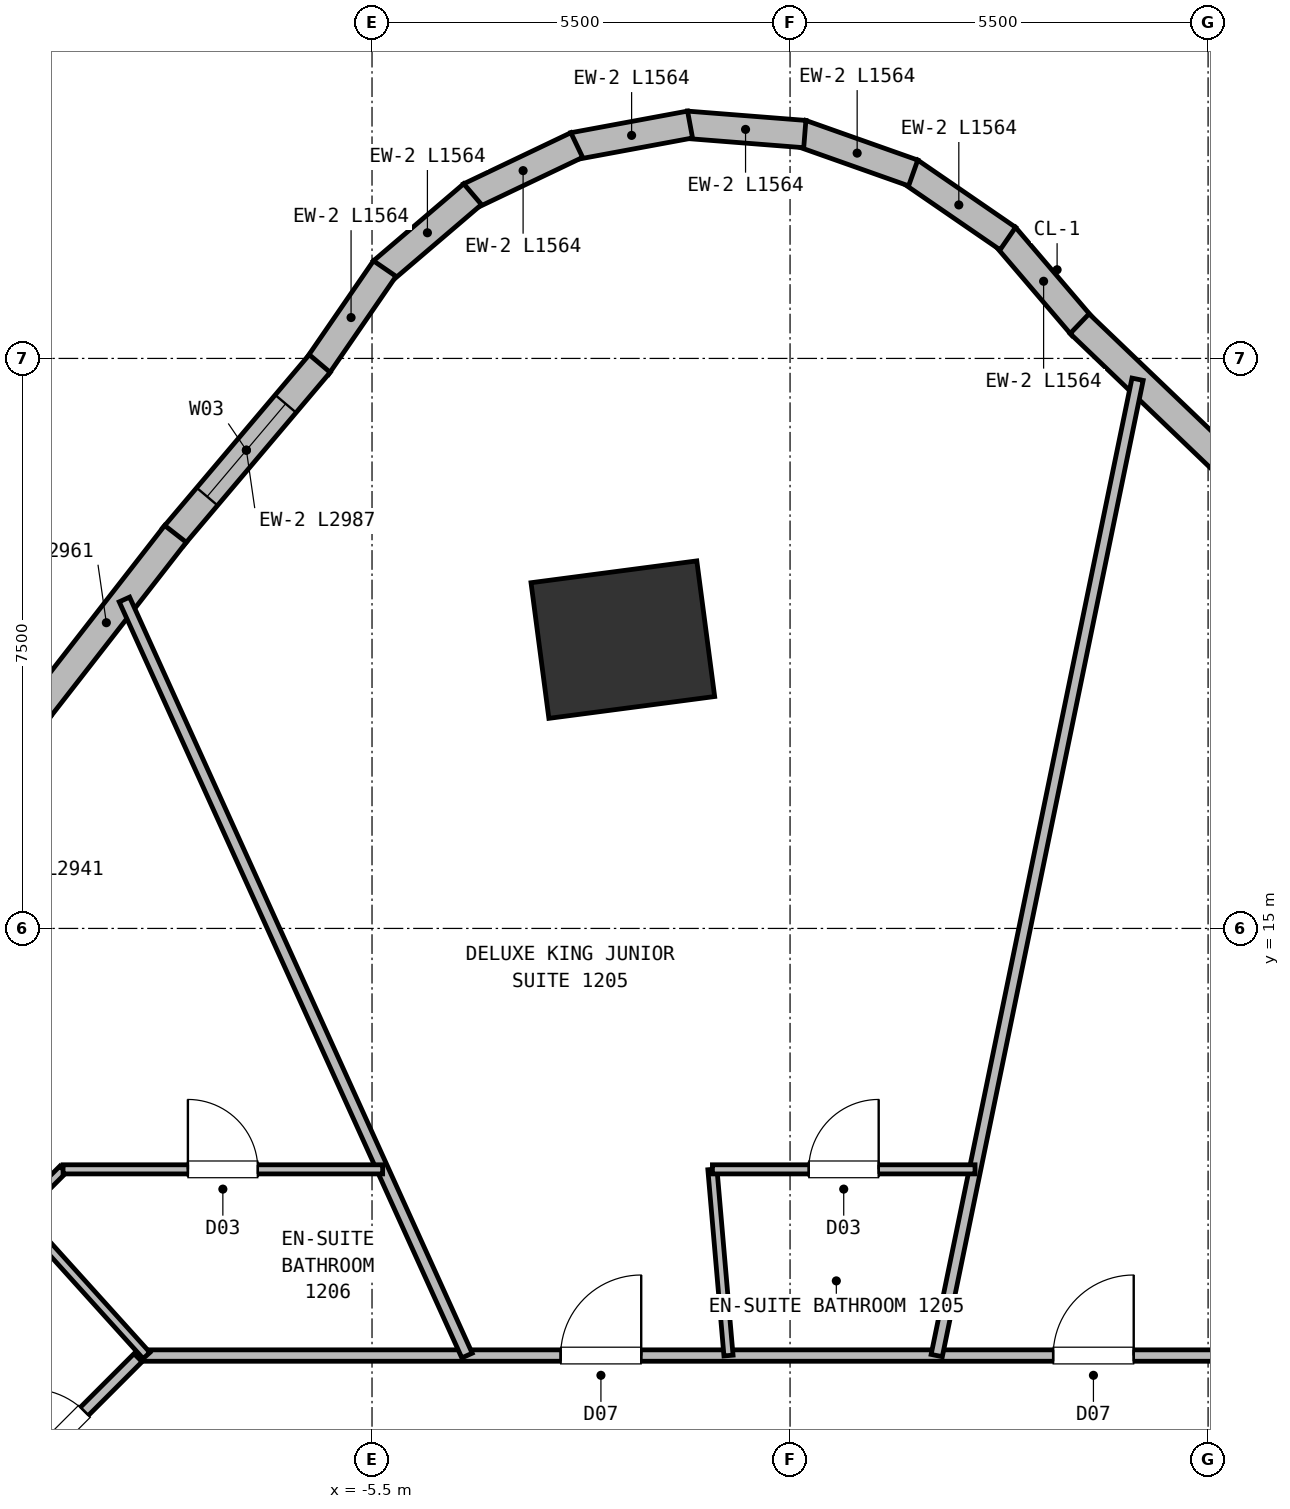
"""IFC4 building model, lengths in metres.
Left out: names, types, materials, properties, quantities, classifications, styles, units other than length and angle.
Written with IfcOpenShell. Run it as: python <this file> out.ifc"""

import sys

from ifc_helpers import new_model, si_unit, direction, frame, frame_2d, origin, origin_2d, place, context, subcontext, project, spatial, rectangle, extrude, element, fill, save


model = new_model("IFC4")
c1 = context("Model", 3, precision=1e-05, world=origin(), true_north=direction((0.0, 1.0)))
c2 = subcontext(c1, "Body", "Model", "MODEL_VIEW")
j1 = project(units=[si_unit("LENGTHUNIT", "METRE"), si_unit("PLANEANGLEUNIT", "RADIAN")], contexts=[c1])
p1 = place(None, origin())
s1 = spatial("IfcSite", under=j1, at=p1, CompositionType="ELEMENT")
p2 = place(p1, origin())
s2 = spatial("IfcBuilding", under=s1, at=p2, CompositionType="ELEMENT")
p3 = place(p2, frame((0.0, 0.0, 41.75)))
s3 = spatial("IfcBuildingStorey", under=s2, at=p3, CompositionType="ELEMENT", Elevation=41.75)
p4 = place(p3, frame((-2.2, 18.8, 0.0), z_axis=(0.0, 0.0, 1.0), x_axis=(-0.13052619222, 0.991444861374, 0.0)))
e1 = element("IfcColumn", 1, at=p4, inside=s3, PredefinedType="COLUMN", context=c2, shape_type="SweptSolid", body=[
    extrude(rectangle(XDim=1.8, YDim=2.2, at=origin_2d()), origin(), (0.0, 0.0, 1.0), 3.75),
])
p5 = place(p3, frame((2.828, 24.11, 0.0), z_axis=(0.0, 0.0, 1.0), x_axis=(0.649427555808, -0.76042346739, 0.0)))
e2 = element("IfcWall", 2, at=p5, inside=s3, PredefinedType="SOLIDWALL", context=c2, shape_type="SweptSolid", body=[
    extrude(rectangle(XDim=1.564, YDim=0.36, at=frame_2d((0.782, 0.0))), origin(), (0.0, 0.0, 1.0), 3.5),
])
p6 = place(p3, frame((1.576, 24.963, 0.0), z_axis=(0.0, 0.0, 1.0), x_axis=(0.824114783412, -0.56642283125, 0.0)))
e3 = element("IfcWall", 3, at=p6, inside=s3, PredefinedType="SOLIDWALL", context=c2, shape_type="SweptSolid", body=[
    extrude(rectangle(XDim=1.564, YDim=0.36, at=frame_2d((0.782, 0.0))), origin(), (0.0, 0.0, 1.0), 3.5),
])
p7 = place(p3, frame((0.146, 25.462, 0.0), z_axis=(0.0, 0.0, 1.0), x_axis=(0.94263541034, -0.333824030251, 0.0)))
e4 = element("IfcWall", 4, at=p7, inside=s3, PredefinedType="SOLIDWALL", context=c2, shape_type="SweptSolid", body=[
    extrude(rectangle(XDim=1.564, YDim=0.36, at=frame_2d((0.782, 0.0))), origin(), (0.0, 0.0, 1.0), 3.5),
])
for number, where, z_axis, x_axis in (
    (5, (-1.365, 25.575, 0.0), (0.0, 0.0, 1.0), (0.997, -0.079, 0.0)),
    (6, (-2.854, 25.292, 0.0), (0.0, 0.0, 1.0), (0.983, 0.182, 0.0)),
):
    element("IfcWall", number, at=place(p3, frame(where, z_axis=z_axis, x_axis=x_axis)), inside=s3, PredefinedType="SOLIDWALL", context=c2, shape_type="SweptSolid", body=[
        extrude(rectangle(XDim=1.564, YDim=0.36, at=frame_2d((0.782, 0.0))), origin(), (0.0, 0.0, 1.0), 3.5),
    ])
p8 = place(p3, frame((-4.218, 24.634, 0.0), z_axis=(0.0, 0.0, 1.0), x_axis=(0.902606480138, 0.430466656099, 0.0)))
e7 = element("IfcWall", 7, at=p8, inside=s3, PredefinedType="SOLIDWALL", context=c2, shape_type="SweptSolid", body=[
    extrude(rectangle(XDim=1.564, YDim=0.36, at=frame_2d((0.782, 0.0))), origin(), (0.0, 0.0, 1.0), 3.5),
])
p9 = place(p3, frame((-5.366, 23.646, 0.0), z_axis=(0.0, 0.0, 1.0), x_axis=(0.760489297029, 0.649350467086, 0.0)))
e8 = element("IfcWall", 8, at=p9, inside=s3, PredefinedType="SOLIDWALL", context=c2, shape_type="SweptSolid", body=[
    extrude(rectangle(XDim=1.564, YDim=0.36, at=frame_2d((0.782, 0.0))), origin(), (0.0, 0.0, 1.0), 3.5),
])
p10 = place(p3, frame((-6.219, 22.393, 0.0), z_axis=(0.0, 0.0, 1.0), x_axis=(0.56642283125, 0.824114783412, 0.0)))
e9 = element("IfcWall", 9, at=p10, inside=s3, PredefinedType="SOLIDWALL", context=c2, shape_type="SweptSolid", body=[
    extrude(rectangle(XDim=1.564, YDim=0.36, at=frame_2d((0.782, 0.0))), origin(), (0.0, 0.0, 1.0), 3.5),
])
p11 = place(p3, frame((-8.117, 20.153, 0.0), z_axis=(0.0, 0.0, 1.0), x_axis=(0.645802996195, 0.763504086502, 0.0)))
e10 = element("IfcWall", 10, at=p11, inside=s3, PredefinedType="SOLIDWALL", context=c2, shape_type="SweptSolid", body=[
    extrude(rectangle(XDim=2.987, YDim=0.36, at=frame_2d((1.493, 0.0))), origin(), (0.0, 0.0, 1.0), 3.5),
])
p12 = place(p11, frame((0.694, 0.0, 0.72)))
e11 = element("IfcOpeningElement", 11, at=p12, cuts=e10, PredefinedType="OPENING", context=c2, shape_type="SweptSolid", body=[
    extrude(rectangle(XDim=1.6, YDim=1.88, at=frame_2d((0.8, 0.94))), frame((0.0, 0.19, 0.0), z_axis=(0.0, -1.0, 0.0), x_axis=(1.0, 0.0, 0.0)), (0.0, 0.0, 1.0), 0.38),
])
p13 = place(p3, frame((-9.905, 17.854, 0.0), z_axis=(0.0, 0.0, 1.0), x_axis=(0.614163171733, 0.789179066174, 0.0)))
e12 = element("IfcWall", 12, at=p13, inside=s3, PredefinedType="SOLIDWALL", context=c2, shape_type="SweptSolid", body=[
    extrude(rectangle(XDim=2.961, YDim=0.36, at=frame_2d((1.481, 0.0))), origin(), (0.0, 0.0, 1.0), 3.5),
])
p14 = place(p3, frame((3.81, 22.957, 0.0), z_axis=(0.0, 0.0, 1.0), x_axis=(0.722146408361, -0.691740243799, 0.0)))
e13 = element("IfcWall", 13, at=p14, inside=s3, PredefinedType="SOLIDWALL", context=c2, shape_type="SweptSolid", body=[
    extrude(rectangle(XDim=2.987, YDim=0.36, at=frame_2d((1.493, 0.0))), origin(), (0.0, 0.0, 1.0), 3.5),
])
p15 = place(p3, frame((-8.51, 9.38, 0.0), z_axis=(0.0, 0.0, 1.0), x_axis=(1.0, 0.0, 0.0)))
e14 = element("IfcWall", 14, at=p15, inside=s3, PredefinedType="PARTITIONING", context=c2, shape_type="SweptSolid", body=[
    extrude(rectangle(XDim=17.02, YDim=0.15, at=frame_2d((8.51, 0.0))), origin(), (0.0, 0.0, 1.0), 3.5),
])
p16 = place(p15, frame((11.971, 0.0, 0.0)))
e15 = element("IfcOpeningElement", 15, at=p16, cuts=e14, PredefinedType="OPENING", context=c2, shape_type="SweptSolid", body=[
    extrude(rectangle(XDim=1.06, YDim=2.15, at=frame_2d((0.53, 1.075))), frame((0.0, 0.085, 0.0), z_axis=(0.0, -1.0, 0.0), x_axis=(1.0, 0.0, 0.0)), (0.0, 0.0, 1.0), 0.17),
])
p17 = place(p15, frame((5.492, 0.0, 0.0)))
e16 = element("IfcOpeningElement", 16, at=p17, cuts=e14, PredefinedType="OPENING", context=c2, shape_type="SweptSolid", body=[
    extrude(rectangle(XDim=1.06, YDim=2.15, at=frame_2d((0.53, 1.075))), frame((0.0, 0.085, 0.0), z_axis=(0.0, -1.0, 0.0), x_axis=(1.0, 0.0, 0.0)), (0.0, 0.0, 1.0), 0.17),
])
p18 = place(p3, frame((-10.752, 7.178, 0.0), z_axis=(0.0, 0.0, 1.0), x_axis=(0.707067066127, 0.707146494016, 0.0)))
e17 = element("IfcWall", 17, at=p18, inside=s3, PredefinedType="PARTITIONING", context=c2, shape_type="SweptSolid", body=[
    extrude(rectangle(XDim=3.074, YDim=0.15, at=frame_2d((1.537, 0.0))), origin(), (0.0, 0.0, 1.0), 3.5),
])
p19 = place(p18, frame((1.077, 0.0, 0.0)))
e18 = element("IfcOpeningElement", 18, at=p19, cuts=e17, PredefinedType="OPENING", context=c2, shape_type="SweptSolid", body=[
    extrude(rectangle(XDim=1.0, YDim=2.15, at=frame_2d((0.5, 1.075))), frame((0.0, 0.085, 0.0), z_axis=(0.0, -1.0, 0.0), x_axis=(1.0, 0.0, 0.0)), (0.0, 0.0, 1.0), 0.17),
])
p20 = place(p3, frame((1.93, 9.38, 0.0), z_axis=(0.0, 0.0, 1.0), x_axis=(0.201507952768, 0.979486878407, 0.0)))
e19 = element("IfcWall", 19, at=p20, inside=s3, PredefinedType="PARTITIONING", context=c2, shape_type="SweptSolid", body=[
    extrude(rectangle(XDim=13.115, YDim=0.15, at=frame_2d((6.558, 0.0))), origin(), (0.0, 0.0, 1.0), 3.5),
])
p21 = place(p3, frame((-0.81, 9.38, 0.0), z_axis=(0.0, 0.0, 1.0), x_axis=(-0.086068429702, 0.996289227789, 0.0)))
e20 = element("IfcWall", 20, at=p21, inside=s3, PredefinedType="PARTITIONING", context=c2, shape_type="SweptSolid", body=[
    extrude(rectangle(XDim=2.459, YDim=0.12, at=frame_2d((1.229, 0.0))), origin(), (0.0, 0.0, 1.0), 3.5),
])
p22 = place(p3, frame((-1.021, 11.83, 0.0), z_axis=(0.0, 0.0, 1.0), x_axis=(1.0, 0.0, 0.0)))
e21 = element("IfcWall", 21, at=p22, inside=s3, PredefinedType="PARTITIONING", context=c2, shape_type="SweptSolid", body=[
    extrude(rectangle(XDim=3.455, YDim=0.12, at=frame_2d((1.728, 0.0))), origin(), (0.0, 0.0, 1.0), 3.5),
])
p23 = place(p22, frame((1.268, 0.0, 0.0)))
e22 = element("IfcOpeningElement", 22, at=p23, cuts=e21, PredefinedType="OPENING", context=c2, shape_type="SweptSolid", body=[
    extrude(rectangle(XDim=0.92, YDim=2.1, at=frame_2d((0.46, 1.05))), frame((0.0, 0.07, 0.0), z_axis=(0.0, -1.0, 0.0), x_axis=(1.0, 0.0, 0.0)), (0.0, 0.0, 1.0), 0.14),
])
p24 = place(p3, frame((-4.25, 9.38, 0.0), z_axis=(0.0, 0.0, 1.0), x_axis=(-0.412704587387, 0.910864931562, 0.0)))
e23 = element("IfcWall", 23, at=p24, inside=s3, PredefinedType="PARTITIONING", context=c2, shape_type="SweptSolid", body=[
    extrude(rectangle(XDim=10.922, YDim=0.15, at=frame_2d((5.461, 0.0))), origin(), (0.0, 0.0, 1.0), 3.5),
])
p25 = place(p3, frame((-10.15, 11.245, 0.0), z_axis=(0.0, 0.0, 1.0), x_axis=(0.670080782296, -0.742288182041, 0.0)))
e24 = element("IfcWall", 24, at=p25, inside=s3, PredefinedType="PARTITIONING", context=c2, shape_type="SweptSolid", body=[
    extrude(rectangle(XDim=2.512, YDim=0.12, at=frame_2d((1.256, 0.0))), origin(), (0.0, 0.0, 1.0), 3.5),
])
p26 = place(p3, frame((-10.15, 11.245, 0.0), z_axis=(0.0, 0.0, 1.0), x_axis=(0.707106781187, 0.707106781187, 0.0)))
e25 = element("IfcWall", 25, at=p26, inside=s3, PredefinedType="PARTITIONING", context=c2, shape_type="SweptSolid", body=[
    extrude(rectangle(XDim=0.828, YDim=0.12, at=frame_2d((0.414, 0.0))), origin(), (0.0, 0.0, 1.0), 3.5),
])
p27 = place(p3, frame((-9.565, 11.83, 0.0), z_axis=(0.0, 0.0, 1.0), x_axis=(1.0, 0.0, 0.0)))
e26 = element("IfcWall", 26, at=p27, inside=s3, PredefinedType="PARTITIONING", context=c2, shape_type="SweptSolid", body=[
    extrude(rectangle(XDim=4.205, YDim=0.12, at=frame_2d((2.102, 0.0))), origin(), (0.0, 0.0, 1.0), 3.5),
])
p28 = place(p27, frame((1.642, 0.0, 0.0)))
e27 = element("IfcOpeningElement", 27, at=p28, cuts=e26, PredefinedType="OPENING", context=c2, shape_type="SweptSolid", body=[
    extrude(rectangle(XDim=0.92, YDim=2.1, at=frame_2d((0.46, 1.05))), frame((0.0, 0.07, 0.0), z_axis=(0.0, -1.0, 0.0), x_axis=(1.0, 0.0, 0.0)), (0.0, 0.0, 1.0), 0.14),
])
p29 = place(p12, origin())
e28 = element("IfcWindow", 28, at=p29, inside=s3, PartitioningType="SINGLE_PANEL", PredefinedType="WINDOW", context=c2, shape_type="SweptSolid", body=[
    extrude(rectangle(XDim=1.6, YDim=1.88, at=frame_2d((0.8, 0.94))), frame((0.0, 0.03, 0.0), z_axis=(0.0, -1.0, 0.0), x_axis=(1.0, 0.0, 0.0)), (0.0, 0.0, 1.0), 0.06),
])
fill(e11, e28)
p30 = place(p23, origin())
e29 = element("IfcDoor", 29, at=p30, inside=s3, OperationType="SINGLE_SWING_RIGHT", PredefinedType="DOOR", context=c2, shape_type="SweptSolid", body=[
    extrude(rectangle(XDim=0.92, YDim=2.1, at=frame_2d((0.46, 1.05))), frame((0.0, 0.025, 0.0), z_axis=(0.0, -1.0, 0.0), x_axis=(1.0, 0.0, 0.0)), (0.0, 0.0, 1.0), 0.05),
])
fill(e22, e29)
p31 = place(p28, origin())
e30 = element("IfcDoor", 30, at=p31, inside=s3, OperationType="SINGLE_SWING_LEFT", PredefinedType="DOOR", context=c2, shape_type="SweptSolid", body=[
    extrude(rectangle(XDim=0.92, YDim=2.1, at=frame_2d((0.46, 1.05))), frame((0.0, 0.025, 0.0), z_axis=(0.0, -1.0, 0.0), x_axis=(1.0, 0.0, 0.0)), (0.0, 0.0, 1.0), 0.05),
])
fill(e27, e30)
p32 = place(p19, origin())
e31 = element("IfcDoor", 31, at=p32, inside=s3, OperationType="SINGLE_SWING_LEFT", PredefinedType="DOOR", context=c2, shape_type="SweptSolid", body=[
    extrude(rectangle(XDim=1.0, YDim=2.15, at=frame_2d((0.5, 1.075))), frame((0.0, 0.025, 0.0), z_axis=(0.0, -1.0, 0.0), x_axis=(1.0, 0.0, 0.0)), (0.0, 0.0, 1.0), 0.05),
])
fill(e18, e31)
p33 = place(p16, origin())
e32 = element("IfcDoor", 32, at=p33, inside=s3, OperationType="SINGLE_SWING_RIGHT", PredefinedType="DOOR", context=c2, shape_type="SweptSolid", body=[
    extrude(rectangle(XDim=1.06, YDim=2.15, at=frame_2d((0.53, 1.075))), frame((0.0, 0.025, 0.0), z_axis=(0.0, -1.0, 0.0), x_axis=(1.0, 0.0, 0.0)), (0.0, 0.0, 1.0), 0.05),
])
fill(e15, e32)
p34 = place(p17, origin())
e33 = element("IfcDoor", 33, at=p34, inside=s3, OperationType="SINGLE_SWING_RIGHT", PredefinedType="DOOR", context=c2, shape_type="SweptSolid", body=[
    extrude(rectangle(XDim=1.06, YDim=2.15, at=frame_2d((0.53, 1.075))), frame((0.0, 0.025, 0.0), z_axis=(0.0, -1.0, 0.0), x_axis=(1.0, 0.0, 0.0)), (0.0, 0.0, 1.0), 0.05),
])
fill(e16, e33)
save(model, sys.argv[1])
